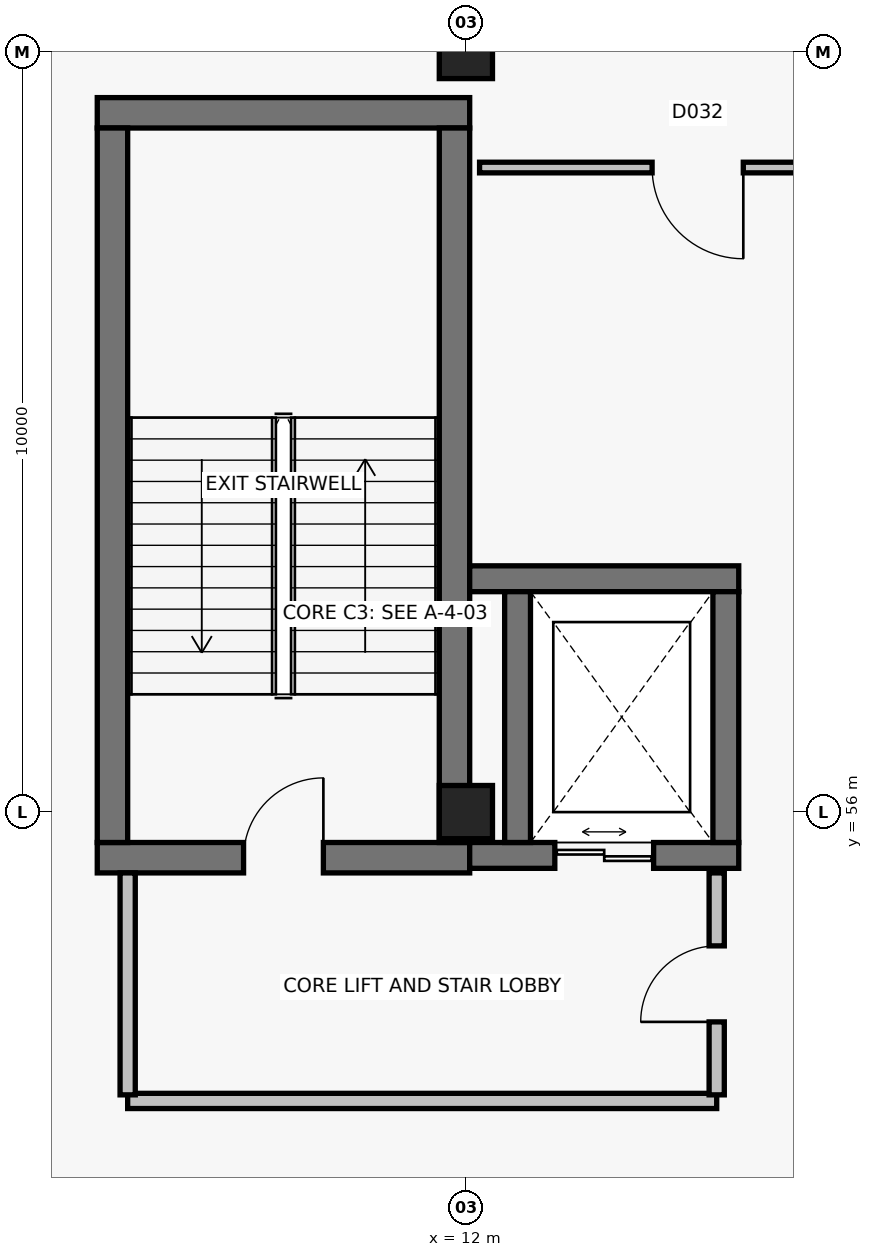
"""IFC4 building model, lengths in metres.
Left out: names, types, materials, properties, quantities, classifications, styles, units other than length and angle.
Written with IfcOpenShell. Run it as: python <this file> out.ifc"""

import sys

from ifc_helpers import new_model, si_unit, direction, frame, frame_2d, origin, origin_2d, place, context, subcontext, project, spatial, rectangle, extrude, element, fill, save


model = new_model("IFC4")
c1 = context("Model", 3, precision=1e-05, world=origin(), true_north=direction((0.0, 1.0)))
c2 = subcontext(c1, "Body", "Model", "MODEL_VIEW")
j1 = project(units=[si_unit("LENGTHUNIT", "METRE"), si_unit("PLANEANGLEUNIT", "RADIAN")], contexts=[c1])
p1 = place(None, origin())
s1 = spatial("IfcSite", under=j1, at=p1, CompositionType="ELEMENT")
p2 = place(p1, origin())
s2 = spatial("IfcBuilding", under=s1, at=p2, CompositionType="ELEMENT")
p3 = place(p2, frame((0.0, 0.0, 6.6)))
s3 = spatial("IfcBuildingStorey", under=s2, at=p3, CompositionType="ELEMENT", Elevation=6.6)
for number, where, z_axis, x_axis in (
    (1, (12.0, 56.0, 0.0), (0.0, 0.0, 1.0), (1.0, 0.0, 0.0)),
    (2, (12.0, 66.0, 0.0), (0.0, 0.0, 1.0), (1.0, 0.0, 0.0)),
):
    element("IfcColumn", number, at=place(p3, frame(where, z_axis=z_axis, x_axis=x_axis)), inside=s3, PredefinedType="COLUMN", context=c2, shape_type="SweptSolid", body=[
        extrude(rectangle(XDim=0.7, YDim=0.7, at=origin_2d()), origin(), (0.0, 0.0, 1.0), 4.8),
    ])
p4 = place(p3, frame((7.15, 55.4, 0.0), z_axis=(0.0, 0.0, 1.0), x_axis=(1.0, 0.0, 0.0)))
e3 = element("IfcWall", 3, at=p4, inside=s3, PredefinedType="SHEAR", context=c2, shape_type="SweptSolid", body=[
    extrude(rectangle(XDim=4.9, YDim=0.4, at=frame_2d((2.45, 0.0))), origin(), (0.0, 0.0, 1.0), 4.54),
])
p5 = place(p4, frame((1.925, 0.0, 0.0)))
e4 = element("IfcOpeningElement", 4, at=p5, cuts=e3, PredefinedType="OPENING", context=c2, shape_type="SweptSolid", body=[
    extrude(rectangle(XDim=1.05, YDim=2.15, at=frame_2d((0.525, 1.075))), frame((0.0, 0.215, 0.0), z_axis=(0.0, -1.0, 0.0), x_axis=(1.0, 0.0, 0.0)), (0.0, 0.0, 1.0), 0.43),
])
p6 = place(p3, frame((12.05, 65.2, 0.0), z_axis=(0.0, 0.0, 1.0), x_axis=(-1.0, 0.0, 0.0)))
e5 = element("IfcWall", 5, at=p6, inside=s3, PredefinedType="SHEAR", context=c2, shape_type="SweptSolid", body=[
    extrude(rectangle(XDim=4.9, YDim=0.4, at=frame_2d((2.45, 0.0))), origin(), (0.0, 0.0, 1.0), 4.54),
])
for number, where, z_axis, x_axis in (
    (6, (7.35, 65.0, 0.0), (0.0, 0.0, 1.0), (0.0, -1.0, 0.0)),
    (7, (11.85, 55.6, 0.0), (0.0, 0.0, 1.0), (0.0, 1.0, 0.0)),
):
    element("IfcWall", number, at=place(p3, frame(where, z_axis=z_axis, x_axis=x_axis)), inside=s3, PredefinedType="SHEAR", context=c2, shape_type="SweptSolid", body=[
        extrude(rectangle(XDim=9.4, YDim=0.4, at=frame_2d((4.7, 0.0))), origin(), (0.0, 0.0, 1.0), 4.54),
    ])
p7 = place(p3, frame((12.05, 55.43, 0.0), z_axis=(0.0, 0.0, 1.0), x_axis=(1.0, 0.0, 0.0)))
e8 = element("IfcWall", 8, at=p7, inside=s3, PredefinedType="SHEAR", context=c2, shape_type="SweptSolid", body=[
    extrude(rectangle(XDim=3.54, YDim=0.34, at=frame_2d((1.77, 0.0))), origin(), (0.0, 0.0, 1.0), 4.54),
])
p8 = place(p7, frame((1.12, 0.0, 0.0)))
e9 = element("IfcOpeningElement", 9, at=p8, cuts=e8, PredefinedType="OPENING", context=c2, shape_type="SweptSolid", body=[
    extrude(rectangle(XDim=1.3, YDim=2.25, at=frame_2d((0.65, 1.125))), frame((0.0, 0.185, 0.0), z_axis=(0.0, -1.0, 0.0), x_axis=(1.0, 0.0, 0.0)), (0.0, 0.0, 1.0), 0.37),
])
p9 = place(p3, frame((15.59, 59.07, 0.0), z_axis=(0.0, 0.0, 1.0), x_axis=(-1.0, 0.0, 0.0)))
e10 = element("IfcWall", 10, at=p9, inside=s3, PredefinedType="SHEAR", context=c2, shape_type="SweptSolid", body=[
    extrude(rectangle(XDim=3.54, YDim=0.34, at=frame_2d((1.77, 0.0))), origin(), (0.0, 0.0, 1.0), 4.54),
])
for number, where, z_axis, x_axis in (
    (11, (12.68, 58.9, 0.0), (0.0, 0.0, 1.0), (0.0, -1.0, 0.0)),
    (12, (15.42, 55.6, 0.0), (0.0, 0.0, 1.0), (0.0, 1.0, 0.0)),
):
    element("IfcWall", number, at=place(p3, frame(where, z_axis=z_axis, x_axis=x_axis)), inside=s3, PredefinedType="SHEAR", context=c2, shape_type="SweptSolid", body=[
        extrude(rectangle(XDim=3.3, YDim=0.34, at=frame_2d((1.65, 0.0))), origin(), (0.0, 0.0, 1.0), 4.54),
    ])
p10 = place(p3, frame((7.55, 52.2, 0.0), z_axis=(0.0, 0.0, 1.0), x_axis=(1.0, 0.0, 0.0)))
e13 = element("IfcWall", 13, at=p10, inside=s3, PredefinedType="PARTITIONING", context=c2, shape_type="SweptSolid", body=[
    extrude(rectangle(XDim=7.75, YDim=0.2, at=frame_2d((3.875, 0.0))), origin(), (0.0, 0.0, 1.0), 3.757),
])
p11 = place(p3, frame((7.55, 55.2, 0.0), z_axis=(0.0, 0.0, 1.0), x_axis=(0.0, -1.0, 0.0)))
e14 = element("IfcWall", 14, at=p11, inside=s3, PredefinedType="PARTITIONING", context=c2, shape_type="SweptSolid", body=[
    extrude(rectangle(XDim=2.92, YDim=0.2, at=frame_2d((1.46, 0.0))), origin(), (0.0, 0.0, 1.0), 4.48),
])
p12 = place(p3, frame((15.3, 52.28, 0.0), z_axis=(0.0, 0.0, 1.0), x_axis=(0.0, 1.0, 0.0)))
e15 = element("IfcWall", 15, at=p12, inside=s3, PredefinedType="PARTITIONING", context=c2, shape_type="SweptSolid", body=[
    extrude(rectangle(XDim=2.92, YDim=0.2, at=frame_2d((1.46, 0.0))), origin(), (0.0, 0.0, 1.0), 4.48),
])
p13 = place(p12, frame((0.96, 0.0, 0.0)))
e16 = element("IfcOpeningElement", 16, at=p13, cuts=e15, PredefinedType="OPENING", context=c2, shape_type="SweptSolid", body=[
    extrude(rectangle(XDim=1.0, YDim=2.15, at=frame_2d((0.5, 1.075))), frame((0.0, 0.115, 0.0), z_axis=(0.0, -1.0, 0.0), x_axis=(1.0, 0.0, 0.0)), (0.0, 0.0, 1.0), 0.23),
])
p14 = place(p3, frame((17.92, 64.48, 0.0), z_axis=(0.0, 0.0, 1.0), x_axis=(-1.0, 0.0, 0.0)))
e17 = element("IfcWall", 17, at=p14, inside=s3, PredefinedType="PARTITIONING", context=c2, shape_type="SweptSolid", body=[
    extrude(rectangle(XDim=5.74, YDim=0.14, at=frame_2d((2.87, 0.0))), origin(), (0.0, 0.0, 1.0), 3.757),
])
p15 = place(p14, frame((2.27, 0.0, 0.0)))
e18 = element("IfcOpeningElement", 18, at=p15, cuts=e17, PredefinedType="OPENING", context=c2, shape_type="SweptSolid", body=[
    extrude(rectangle(XDim=1.2, YDim=2.15, at=frame_2d((0.6, 1.075))), frame((0.0, 0.085, 0.0), z_axis=(0.0, -1.0, 0.0), x_axis=(1.0, 0.0, 0.0)), (0.0, 0.0, 1.0), 0.17),
])
p16 = place(p5, origin())
e19 = element("IfcDoor", 19, at=p16, inside=s3, OperationType="SINGLE_SWING_RIGHT", PredefinedType="DOOR", context=c2, shape_type="SweptSolid", body=[
    extrude(rectangle(XDim=1.05, YDim=2.15, at=frame_2d((0.525, 1.075))), frame((0.0, 0.025, 0.0), z_axis=(0.0, -1.0, 0.0), x_axis=(1.0, 0.0, 0.0)), (0.0, 0.0, 1.0), 0.05),
])
fill(e4, e19)
p17 = place(p8, origin())
e20 = element("IfcDoor", 20, at=p17, inside=s3, OperationType="DOUBLE_DOOR_SLIDING", PredefinedType="DOOR", context=c2, shape_type="SweptSolid", body=[
    extrude(rectangle(XDim=1.3, YDim=2.25, at=frame_2d((0.65, 1.125))), frame((0.0, 0.025, 0.0), z_axis=(0.0, -1.0, 0.0), x_axis=(1.0, 0.0, 0.0)), (0.0, 0.0, 1.0), 0.05),
])
fill(e9, e20)
p18 = place(p13, origin())
e21 = element("IfcDoor", 21, at=p18, inside=s3, OperationType="SINGLE_SWING_LEFT", PredefinedType="DOOR", context=c2, shape_type="SweptSolid", body=[
    extrude(rectangle(XDim=1.0, YDim=2.15, at=frame_2d((0.5, 1.075))), frame((0.0, 0.025, 0.0), z_axis=(0.0, -1.0, 0.0), x_axis=(1.0, 0.0, 0.0)), (0.0, 0.0, 1.0), 0.05),
])
fill(e16, e21)
p19 = place(p15, origin())
e22 = element("IfcDoor", 22, at=p19, inside=s3, OperationType="SINGLE_SWING_LEFT", PredefinedType="DOOR", context=c2, shape_type="SweptSolid", body=[
    extrude(rectangle(XDim=1.2, YDim=2.15, at=frame_2d((0.6, 1.075))), frame((0.0, 0.025, 0.0), z_axis=(0.0, -1.0, 0.0), x_axis=(1.0, 0.0, 0.0)), (0.0, 0.0, 1.0), 0.05),
])
fill(e18, e22)
save(model, sys.argv[1])
